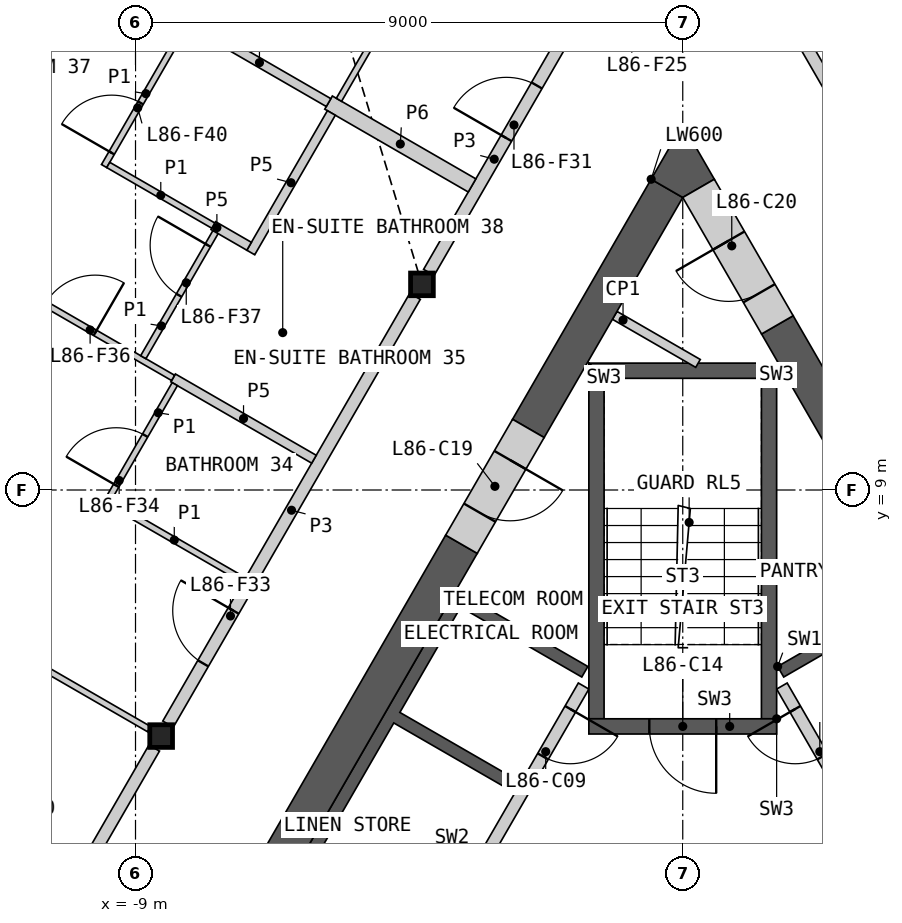
"""IFC4 building model, lengths in metres.
Left out: names, types, materials, properties, quantities, classifications, styles, units other than length and angle.
Written with IfcOpenShell. Run it as: python <this file> out.ifc"""

import sys

from ifc_helpers import new_model, si_unit, direction, frame, frame_2d, origin, origin_2d, place, context, subcontext, project, spatial, polyline, rectangle, i_section, outline, extrude, element, fill, save


model = new_model("IFC4")
c1 = context("Model", 3, precision=1e-05, world=origin(), true_north=direction((0.0, 1.0)))
c2 = subcontext(c1, "Body", "Model", "MODEL_VIEW")
j1 = project(units=[si_unit("LENGTHUNIT", "METRE"), si_unit("PLANEANGLEUNIT", "RADIAN")], contexts=[c1])
p1 = place(None, origin())
s1 = spatial("IfcSite", under=j1, at=p1, CompositionType="ELEMENT")
p2 = place(p1, origin())
s2 = spatial("IfcBuilding", under=s1, at=p2, CompositionType="ELEMENT")
p3 = place(p2, frame((0.0, 0.0, 381.4)))
s3 = spatial("IfcBuildingStorey", under=s2, at=p3, CompositionType="ELEMENT", Elevation=381.4)
for number, where, z_axis, x_axis in (
    (1, (-4.289, 12.382, 0.0), (0.0, 0.0, 1.0), (1.0, 0.0, 0.0)),
    (2, (-8.578, 4.953, 0.0), (0.0, 0.0, 1.0), (1.0, 0.0, 0.0)),
):
    element("IfcColumn", number, at=place(p3, frame(where, z_axis=z_axis, x_axis=x_axis)), inside=s3, PredefinedType="COLUMN", context=c2, shape_type="SweptSolid", body=[
        extrude(i_section(OverallWidth=0.374, OverallDepth=0.372, WebThickness=0.016, FlangeThickness=0.026, at=origin_2d()), origin(), (0.0, 0.0, 1.0), 3.4),
    ])
p4 = place(p3, origin())
e3 = element("IfcWall", 3, at=p4, inside=s3, PredefinedType="SHEAR", context=c2, shape_type="SweptSolid", body=[
    extrude(outline(polyline([(1.561, 6.097), (3.731, 7.35), (8.231, -0.444), (6.061, -1.697), (5.96, -1.524), (7.952, -0.374), (6.952, 1.358), (4.96, 0.208), (4.861, 0.381), (6.852, 1.531), (5.852, 3.263), (3.861, 2.113), (3.76, 2.287), (5.752, 3.437), (4.752, 5.169), (2.76, 4.019), (2.66, 4.192), (4.652, 5.342), (3.652, 7.074), (1.66, 5.924), (1.561, 6.097)])), origin(), (0.0, 0.0, 1.0), 3.1),
])
p5 = place(p3, frame((5.817, -1.476, 0.0), z_axis=(0.0, 0.0, 1.0), x_axis=(-0.500002616675, 0.866023893041, 0.0)))
e4 = element("IfcWall", 4, at=p5, inside=s3, PredefinedType="SOLIDWALL", context=c2, shape_type="SweptSolid", body=[
    extrude(rectangle(XDim=8.373, YDim=0.2, at=frame_2d((4.187, 0.0))), origin(), (0.0, 0.0, 1.0), 3.1),
])
p6 = place(p5, frame((0.337, 0.0, 0.0)))
e5 = element("IfcOpeningElement", 5, at=p6, cuts=e4, PredefinedType="OPENING", context=c2, shape_type="SweptSolid", body=[
    extrude(rectangle(XDim=1.1, YDim=2.1, at=frame_2d((0.55, 1.05))), frame((0.0, 0.11, 0.0), z_axis=(0.0, -1.0, 0.0), x_axis=(1.0, 0.0, 0.0)), (0.0, 0.0, 1.0), 0.22),
])
p7 = place(p5, frame((2.537, 0.0, 0.0)))
e6 = element("IfcOpeningElement", 6, at=p7, cuts=e4, PredefinedType="OPENING", context=c2, shape_type="SweptSolid", body=[
    extrude(rectangle(XDim=1.1, YDim=2.1, at=frame_2d((0.55, 1.05))), frame((0.0, 0.11, 0.0), z_axis=(0.0, -1.0, 0.0), x_axis=(1.0, 0.0, 0.0)), (0.0, 0.0, 1.0), 0.22),
])
p8 = place(p5, frame((4.737, 0.0, 0.0)))
e7 = element("IfcOpeningElement", 7, at=p8, cuts=e4, PredefinedType="OPENING", context=c2, shape_type="SweptSolid", body=[
    extrude(rectangle(XDim=1.1, YDim=2.1, at=frame_2d((0.55, 1.05))), frame((0.0, 0.11, 0.0), z_axis=(0.0, -1.0, 0.0), x_axis=(1.0, 0.0, 0.0)), (0.0, 0.0, 1.0), 0.22),
])
p9 = place(p5, frame((7.037, 0.0, 0.0)))
e8 = element("IfcOpeningElement", 8, at=p9, cuts=e4, PredefinedType="OPENING", context=c2, shape_type="SweptSolid", body=[
    extrude(rectangle(XDim=0.9, YDim=2.1, at=frame_2d((0.45, 1.05))), frame((0.0, 0.11, 0.0), z_axis=(0.0, -1.0, 0.0), x_axis=(1.0, 0.0, 0.0)), (0.0, 0.0, 1.0), 0.22),
])
p10 = place(p3, origin())
e9 = element("IfcWall", 9, at=p10, inside=s3, PredefinedType="SHEAR", context=c2, shape_type="SweptSolid", body=[
    extrude(outline(polyline([(-4.96, 0.208), (-7.131, 1.461), (-3.731, 7.35), (-1.561, 6.097), (-1.66, 5.924), (-3.652, 7.074), (-4.652, 5.342), (-2.66, 4.192), (-2.76, 4.019), (-4.752, 5.169), (-6.852, 1.531), (-4.861, 0.381), (-4.96, 0.208)])), origin(), (0.0, 0.0, 1.0), 3.1),
])
p11 = place(p3, frame((-1.631, 5.776, 0.0), z_axis=(0.0, 0.0, 1.0), x_axis=(-0.499992876559, -0.866029516466, 0.0)))
e10 = element("IfcWall", 10, at=p11, inside=s3, PredefinedType="SOLIDWALL", context=c2, shape_type="SweptSolid", body=[
    extrude(rectangle(XDim=6.486, YDim=0.2, at=frame_2d((3.243, 0.0))), origin(), (0.0, 0.0, 1.0), 3.1),
])
p12 = place(p11, frame((0.437, 0.0, 0.0)))
e11 = element("IfcOpeningElement", 11, at=p12, cuts=e10, PredefinedType="OPENING", context=c2, shape_type="SweptSolid", body=[
    extrude(rectangle(XDim=0.9, YDim=2.1, at=frame_2d((0.45, 1.05))), frame((0.0, 0.11, 0.0), z_axis=(0.0, -1.0, 0.0), x_axis=(1.0, 0.0, 0.0)), (0.0, 0.0, 1.0), 0.22),
])
p13 = place(p11, frame((3.737, 0.0, 0.0)))
e12 = element("IfcOpeningElement", 12, at=p13, cuts=e10, PredefinedType="OPENING", context=c2, shape_type="SweptSolid", body=[
    extrude(rectangle(XDim=0.9, YDim=2.1, at=frame_2d((0.45, 1.05))), frame((0.0, 0.11, 0.0), z_axis=(0.0, -1.0, 0.0), x_axis=(1.0, 0.0, 0.0)), (0.0, 0.0, 1.0), 0.22),
])
p14 = place(p3, origin())
e13 = element("IfcWall", 13, at=p14, inside=s3, PredefinedType="SHEAR", context=c2, shape_type="SweptSolid", body=[
    extrude(outline(polyline([(1.544, 5.237), (1.544, 11.087), (1.294, 10.837), (1.294, 5.237), (1.544, 5.237)])), origin(), (0.0, 0.0, 1.0), 3.1),
])
p15 = place(p3, origin())
e14 = element("IfcWall", 14, at=p15, inside=s3, PredefinedType="SHEAR", context=c2, shape_type="SweptSolid", body=[
    extrude(outline(polyline([(1.544, 11.087), (-1.544, 11.087), (-1.294, 10.837), (1.294, 10.837), (1.544, 11.087)])), origin(), (0.0, 0.0, 1.0), 3.1),
])
p16 = place(p3, origin())
e15 = element("IfcWall", 15, at=p16, inside=s3, PredefinedType="SHEAR", context=c2, shape_type="SweptSolid", body=[
    extrude(outline(polyline([(-1.294, 10.837), (-1.544, 11.087), (-1.544, 5.237), (-1.294, 5.237), (-1.294, 10.837)])), origin(), (0.0, 0.0, 1.0), 3.1),
])
p17 = place(p3, frame((1.544, 5.112, 0.0), z_axis=(0.0, 0.0, 1.0), x_axis=(-1.0, 0.0, 0.0)))
e16 = element("IfcWall", 16, at=p17, inside=s3, PredefinedType="SHEAR", context=c2, shape_type="SweptSolid", body=[
    extrude(rectangle(XDim=3.088, YDim=0.25, at=frame_2d((1.544, 0.0))), origin(), (0.0, 0.0, 1.0), 3.1),
])
p18 = place(p17, frame((0.994, 0.0, 0.0)))
e17 = element("IfcOpeningElement", 17, at=p18, cuts=e16, PredefinedType="OPENING", context=c2, shape_type="SweptSolid", body=[
    extrude(rectangle(XDim=1.1, YDim=2.1, at=frame_2d((0.55, 1.05))), frame((0.0, 0.135, 0.0), z_axis=(0.0, -1.0, 0.0), x_axis=(1.0, 0.0, 0.0)), (0.0, 0.0, 1.0), 0.27),
])
p19 = place(p3, frame((-1.119, 11.873, 0.0), z_axis=(0.0, 0.0, 1.0), x_axis=(0.865992812752, -0.500056445075, 0.0)))
e18 = element("IfcWall", 18, at=p19, inside=s3, PredefinedType="PARTITIONING", context=c2, shape_type="SweptSolid", body=[
    extrude(rectangle(XDim=1.582, YDim=0.15, at=frame_2d((0.791, 0.0))), origin(), (0.0, 0.0, 1.0), 3.1),
])
p20 = place(p3, frame((8.841, -0.902, 0.0), z_axis=(0.0, 0.0, 1.0), x_axis=(-0.499995618375, 0.866027933502, 0.0)))
e19 = element("IfcWall", 19, at=p20, inside=s3, PredefinedType="SHEAR", context=c2, shape_type="SweptSolid", body=[
    extrude(rectangle(XDim=14.571, YDim=0.6, at=frame_2d((7.285, 0.0))), origin(), (0.0, 0.0, 1.0), 3.1),
])
p21 = place(p3, frame((-3.639, 8.107, 0.0), z_axis=(0.0, 0.0, 1.0), x_axis=(-0.49999180351, -0.866030135978, 0.0)))
e20 = element("IfcWall", 20, at=p21, inside=s3, PredefinedType="SHEAR", context=c2, shape_type="SweptSolid", body=[
    extrude(rectangle(XDim=7.401, YDim=0.6, at=frame_2d((3.701, 0.0))), origin(), (0.0, 0.0, 1.0), 3.1),
])
p22 = place(p3, frame((-0.26, 13.961, 0.0), z_axis=(0.0, 0.0, 1.0), x_axis=(-0.499980485389, -0.866036670257, 0.0)))
e21 = element("IfcWall", 21, at=p22, inside=s3, PredefinedType="SHEAR", context=c2, shape_type="SweptSolid", body=[
    extrude(rectangle(XDim=4.559, YDim=0.6, at=frame_2d((2.28, 0.0))), origin(), (0.0, 0.0, 1.0), 3.1),
])
p23 = place(p3, origin())
e22 = element("IfcWall", 22, at=p23, inside=s3, PredefinedType="SHEAR", context=c2, shape_type="SweptSolid", body=[
    extrude(outline(polyline([(-0.52, 14.111), (0.0, 15.011), (0.52, 14.111), (0.0, 13.811), (-0.52, 14.111)])), origin(), (0.0, 0.0, 1.0), 3.1),
])
p24 = place(p3, frame((-2.539, 10.013, 0.0), z_axis=(0.0, 0.0, 1.0), x_axis=(-0.50002983664, -0.866008176907, 0.0)))
e23 = element("IfcWall", 23, at=p24, inside=s3, PredefinedType="SHEAR", context=c2, shape_type="SweptSolid", body=[
    extrude(rectangle(XDim=2.2, YDim=0.6, at=frame_2d((1.1, 0.0))), origin(), (0.0, 0.0, 1.0), 3.1),
])
p25 = place(p24, frame((0.6, 0.0, 0.0)))
e24 = element("IfcOpeningElement", 24, at=p25, cuts=e23, PredefinedType="OPENING", context=c2, shape_type="SweptSolid", body=[
    extrude(rectangle(XDim=1.0, YDim=2.1, at=frame_2d((0.5, 1.05))), frame((0.0, 0.31, 0.0), z_axis=(0.0, -1.0, 0.0), x_axis=(1.0, 0.0, 0.0)), (0.0, 0.0, 1.0), 0.62),
])
p26 = place(p3, frame((1.556, 11.716, 0.0), z_axis=(0.0, 0.0, 1.0), x_axis=(-0.500018667571, 0.866014625789, 0.0)))
e25 = element("IfcWall", 25, at=p26, inside=s3, PredefinedType="SHEAR", context=c2, shape_type="SweptSolid", body=[
    extrude(rectangle(XDim=2.592, YDim=0.6, at=frame_2d((1.296, 0.0))), origin(), (0.0, 0.0, 1.0), 3.1),
])
p27 = place(p26, frame((0.6, 0.0, 0.0)))
e26 = element("IfcOpeningElement", 26, at=p27, cuts=e25, PredefinedType="OPENING", context=c2, shape_type="SweptSolid", body=[
    extrude(rectangle(XDim=1.0, YDim=2.1, at=frame_2d((0.5, 1.05))), frame((0.0, 0.31, 0.0), z_axis=(0.0, -1.0, 0.0), x_axis=(1.0, 0.0, 0.0)), (0.0, 0.0, 1.0), 0.62),
])
p28 = place(p3, frame((-8.465, 5.15, 0.0), z_axis=(0.0, 0.0, 1.0), x_axis=(0.499992155518, 0.866029932751, 0.0)))
e27 = element("IfcWall", 27, at=p28, inside=s3, PredefinedType="PARTITIONING", context=c2, shape_type="SweptSolid", body=[
    extrude(rectangle(XDim=8.123, YDim=0.2, at=frame_2d((4.062, 0.0))), origin(), (0.0, 0.0, 1.0), 3.1),
])
p29 = place(p28, frame((1.153, 0.0, 0.0)))
e28 = element("IfcOpeningElement", 28, at=p29, cuts=e27, PredefinedType="OPENING", context=c2, shape_type="SweptSolid", body=[
    extrude(rectangle(XDim=1.0, YDim=2.1, at=frame_2d((0.5, 1.05))), frame((0.0, 0.11, 0.0), z_axis=(0.0, -1.0, 0.0), x_axis=(1.0, 0.0, 0.0)), (0.0, 0.0, 1.0), 0.22),
])
p30 = place(p3, frame((-12.754, -2.279, 0.0), z_axis=(0.0, 0.0, 1.0), x_axis=(0.500001682468, 0.866024432409, 0.0)))
e29 = element("IfcWall", 29, at=p30, inside=s3, PredefinedType="PARTITIONING", context=c2, shape_type="SweptSolid", body=[
    extrude(rectangle(XDim=8.124, YDim=0.2, at=frame_2d((4.062, 0.0))), origin(), (0.0, 0.0, 1.0), 3.1),
])
p31 = place(p30, frame((1.153, 0.0, 0.0)))
e30 = element("IfcOpeningElement", 30, at=p31, cuts=e29, PredefinedType="OPENING", context=c2, shape_type="SweptSolid", body=[
    extrude(rectangle(XDim=1.0, YDim=2.1, at=frame_2d((0.5, 1.05))), frame((0.0, 0.11, 0.0), z_axis=(0.0, -1.0, 0.0), x_axis=(1.0, 0.0, 0.0)), (0.0, 0.0, 1.0), 0.22),
])
p32 = place(p3, frame((1.913, 16.498, 0.0), z_axis=(0.0, 0.0, 1.0), x_axis=(0.499974648164, -0.866040040179, 0.0)))
e31 = element("IfcWall", 31, at=p32, inside=s3, PredefinedType="PARTITIONING", context=c2, shape_type="SweptSolid", body=[
    extrude(rectangle(XDim=4.525, YDim=0.2, at=frame_2d((2.263, 0.0))), origin(), (0.0, 0.0, 1.0), 3.1),
])
p33 = place(p3, frame((-4.176, 12.579, 0.0), z_axis=(0.0, 0.0, 1.0), x_axis=(0.500004215162, 0.866022970146, 0.0)))
e32 = element("IfcWall", 32, at=p33, inside=s3, PredefinedType="PARTITIONING", context=c2, shape_type="SweptSolid", body=[
    extrude(rectangle(XDim=4.3, YDim=0.2, at=frame_2d((2.15, 0.0))), origin(), (0.0, 0.0, 1.0), 3.1),
])
p34 = place(p33, frame((2.55, 0.0, 0.0)))
e33 = element("IfcOpeningElement", 33, at=p34, cuts=e32, PredefinedType="OPENING", context=c2, shape_type="SweptSolid", body=[
    extrude(rectangle(XDim=1.0, YDim=2.1, at=frame_2d((0.5, 1.05))), frame((0.0, 0.11, 0.0), z_axis=(0.0, -1.0, 0.0), x_axis=(1.0, 0.0, 0.0)), (0.0, 0.0, 1.0), 0.22),
])
p35 = place(p3, frame((-5.825, 15.372, 0.0), z_axis=(0.0, 0.0, 1.0), x_axis=(0.866051307416, -0.49995513091, 0.0)))
e34 = element("IfcWall", 34, at=p35, inside=s3, PredefinedType="PARTITIONING", context=c2, shape_type="SweptSolid", body=[
    extrude(rectangle(XDim=2.725, YDim=0.25, at=frame_2d((1.362, 0.0))), origin(), (0.0, 0.0, 1.0), 2.33),
])
p36 = place(p3, frame((-8.098, 16.684, 0.0), z_axis=(0.0, 0.0, 1.0), x_axis=(0.866036909293, -0.499980071345, 0.0)))
e35 = element("IfcWall", 35, at=p36, inside=s3, PredefinedType="PLUMBINGWALL", context=c2, shape_type="SweptSolid", body=[
    extrude(rectangle(XDim=2.625, YDim=0.15, at=frame_2d((1.312, 0.0))), origin(), (0.0, 0.0, 1.0), 2.33),
])
p37 = place(p3, frame((-8.382, 10.844, 0.0), z_axis=(0.0, 0.0, 1.0), x_axis=(0.866021425885, -0.500006889861, 0.0)))
e36 = element("IfcWall", 36, at=p37, inside=s3, PredefinedType="PLUMBINGWALL", context=c2, shape_type="SweptSolid", body=[
    extrude(rectangle(XDim=2.675, YDim=0.15, at=frame_2d((1.337, 0.0))), origin(), (0.0, 0.0, 1.0), 2.33),
])
p38 = place(p3, frame((-7.104, 12.906, 0.0), z_axis=(0.0, 0.0, 1.0), x_axis=(0.499993606316, 0.866029095148, 0.0)))
e37 = element("IfcWall", 37, at=p38, inside=s3, PredefinedType="PLUMBINGWALL", context=c2, shape_type="SweptSolid", body=[
    extrude(rectangle(XDim=2.65, YDim=0.15, at=frame_2d((1.325, 0.0))), origin(), (0.0, 0.0, 1.0), 2.33),
])
p39 = place(p3, frame((-7.72, 13.349, 0.0), z_axis=(0.0, 0.0, 1.0), x_axis=(0.866113839764, -0.499846793097, 0.0)))
e38 = element("IfcWall", 38, at=p39, inside=s3, PredefinedType="PLUMBINGWALL", context=c2, shape_type="SweptSolid", body=[
    extrude(rectangle(XDim=0.68, YDim=0.15, at=frame_2d((0.34, 0.0))), origin(), (0.0, 0.0, 1.0), 2.33),
])
p40 = place(p3, frame((-18.869, 10.894, 0.0), z_axis=(0.0, 0.0, 1.0), x_axis=(0.866023724155, -0.500002909193, 0.0)))
e39 = element("IfcWall", 39, at=p40, inside=s3, PredefinedType="PARTITIONING", context=c2, shape_type="SweptSolid", body=[
    extrude(rectangle(XDim=11.655, YDim=0.1, at=frame_2d((5.827, 0.0))), origin(), (0.0, 0.0, 1.0), 2.33),
])
p41 = place(p40, frame((6.253, 0.0, 0.0)))
e40 = element("IfcOpeningElement", 40, at=p41, cuts=e39, PredefinedType="OPENING", context=c2, shape_type="SweptSolid", body=[
    extrude(rectangle(XDim=0.95, YDim=2.1, at=frame_2d((0.475, 1.05))), frame((0.0, 0.06, 0.0), z_axis=(0.0, -1.0, 0.0), x_axis=(1.0, 0.0, 0.0)), (0.0, 0.0, 1.0), 0.12),
])
p42 = place(p3, frame((-9.517, 14.328, 0.0), z_axis=(0.0, 0.0, 1.0), x_axis=(0.499996545922, 0.866027397988, 0.0)))
e41 = element("IfcWall", 41, at=p42, inside=s3, PredefinedType="PARTITIONING", context=c2, shape_type="SweptSolid", body=[
    extrude(rectangle(XDim=5.5, YDim=0.1, at=frame_2d((2.75, 0.0))), origin(), (0.0, 0.0, 1.0), 2.33),
])
p43 = place(p42, frame((4.3, 0.0, 0.0)))
e42 = element("IfcOpeningElement", 42, at=p43, cuts=e41, PredefinedType="OPENING", context=c2, shape_type="SweptSolid", body=[
    extrude(rectangle(XDim=0.95, YDim=2.1, at=frame_2d((0.475, 1.05))), frame((0.0, 0.06, 0.0), z_axis=(0.0, -1.0, 0.0), x_axis=(1.0, 0.0, 0.0)), (0.0, 0.0, 1.0), 0.12),
])
p44 = place(p42, frame((0.25, 0.0, 0.0)))
e43 = element("IfcOpeningElement", 43, at=p44, cuts=e41, PredefinedType="OPENING", context=c2, shape_type="SweptSolid", body=[
    extrude(rectangle(XDim=0.95, YDim=2.1, at=frame_2d((0.475, 1.05))), frame((0.0, 0.06, 0.0), z_axis=(0.0, -1.0, 0.0), x_axis=(1.0, 0.0, 0.0)), (0.0, 0.0, 1.0), 0.12),
])
p45 = place(p3, frame((-12.214, 13.056, 0.0), z_axis=(0.0, 0.0, 1.0), x_axis=(0.866017452598, -0.500013771606, 0.0)))
e44 = element("IfcWall", 44, at=p45, inside=s3, PredefinedType="PARTITIONING", context=c2, shape_type="SweptSolid", body=[
    extrude(rectangle(XDim=4.425, YDim=0.1, at=frame_2d((2.213, 0.0))), origin(), (0.0, 0.0, 1.0), 2.33),
])
p46 = place(p45, frame((1.994, 0.0, 0.0)))
e45 = element("IfcOpeningElement", 45, at=p46, cuts=e44, PredefinedType="OPENING", context=c2, shape_type="SweptSolid", body=[
    extrude(rectangle(XDim=0.95, YDim=2.1, at=frame_2d((0.475, 1.05))), frame((0.0, 0.06, 0.0), z_axis=(0.0, -1.0, 0.0), x_axis=(1.0, 0.0, 0.0)), (0.0, 0.0, 1.0), 0.12),
])
p47 = place(p3, frame((-5.654, 15.418, 0.0), z_axis=(0.0, 0.0, 1.0), x_axis=(0.500048846702, 0.865997200291, 0.0)))
e46 = element("IfcWall", 46, at=p47, inside=s3, PredefinedType="PARTITIONING", context=c2, shape_type="SweptSolid", body=[
    extrude(rectangle(XDim=2.525, YDim=0.1, at=frame_2d((1.263, 0.0))), origin(), (0.0, 0.0, 1.0), 2.33),
])
p48 = place(p3, frame((-9.51, 8.839, 0.0), z_axis=(0.0, 0.0, 1.0), x_axis=(0.866029095148, -0.499993606316, 0.0)))
e47 = element("IfcWall", 47, at=p48, inside=s3, PredefinedType="PARTITIONING", context=c2, shape_type="SweptSolid", body=[
    extrude(rectangle(XDim=2.65, YDim=0.1, at=frame_2d((1.325, 0.0))), origin(), (0.0, 0.0, 1.0), 2.33),
])
p49 = place(p3, frame((-8.872, 11.184, 0.0), z_axis=(0.0, 0.0, 1.0), x_axis=(0.499986429846, 0.866033238375, 0.0)))
e48 = element("IfcWall", 48, at=p49, inside=s3, PredefinedType="PARTITIONING", context=c2, shape_type="SweptSolid", body=[
    extrude(rectangle(XDim=2.375, YDim=0.1, at=frame_2d((1.188, 0.0))), origin(), (0.0, 0.0, 1.0), 2.33),
])
p50 = place(p49, frame((1.175, 0.0, 0.0)))
e49 = element("IfcOpeningElement", 49, at=p50, cuts=e48, PredefinedType="OPENING", context=c2, shape_type="SweptSolid", body=[
    extrude(rectangle(XDim=0.95, YDim=2.1, at=frame_2d((0.475, 1.05))), frame((0.0, 0.06, 0.0), z_axis=(0.0, -1.0, 0.0), x_axis=(1.0, 0.0, 0.0)), (0.0, 0.0, 1.0), 0.12),
])
p51 = place(p3, frame((-9.442, 8.858, 0.0), z_axis=(0.0, 0.0, 1.0), x_axis=(0.499978335414, 0.866037911478, 0.0)))
e50 = element("IfcWall", 50, at=p51, inside=s3, PredefinedType="PARTITIONING", context=c2, shape_type="SweptSolid", body=[
    extrude(rectangle(XDim=2.175, YDim=0.1, at=frame_2d((1.087, 0.0))), origin(), (0.0, 0.0, 1.0), 2.33),
])
p52 = place(p51, frame((0.25, 0.0, 0.0)))
e51 = element("IfcOpeningElement", 51, at=p52, cuts=e50, PredefinedType="OPENING", context=c2, shape_type="SweptSolid", body=[
    extrude(rectangle(XDim=0.95, YDim=2.1, at=frame_2d((0.475, 1.05))), frame((0.0, 0.06, 0.0), z_axis=(0.0, -1.0, 0.0), x_axis=(1.0, 0.0, 0.0)), (0.0, 0.0, 1.0), 0.12),
])
p53 = place(p3, frame((-9.448, 14.346, 0.0), z_axis=(0.0, 0.0, 1.0), x_axis=(0.866020521143, -0.500008456887, 0.0)))
e52 = element("IfcWall", 52, at=p53, inside=s3, PredefinedType="PARTITIONING", context=c2, shape_type="SweptSolid", body=[
    extrude(rectangle(XDim=1.995, YDim=0.1, at=frame_2d((0.998, 0.0))), origin(), (0.0, 0.0, 1.0), 2.33),
])
p54 = place(p9, origin())
e53 = element("IfcDoor", 53, at=p54, inside=s3, OperationType="SINGLE_SWING_RIGHT", PredefinedType="DOOR", context=c2, shape_type="SweptSolid", body=[
    extrude(rectangle(XDim=0.9, YDim=2.1, at=frame_2d((0.45, 1.05))), frame((0.0, 0.025, 0.0), z_axis=(0.0, -1.0, 0.0), x_axis=(1.0, 0.0, 0.0)), (0.0, 0.0, 1.0), 0.05),
])
fill(e8, e53)
p55 = place(p12, origin())
e54 = element("IfcDoor", 54, at=p55, inside=s3, OperationType="SINGLE_SWING_LEFT", PredefinedType="DOOR", context=c2, shape_type="SweptSolid", body=[
    extrude(rectangle(XDim=0.9, YDim=2.1, at=frame_2d((0.45, 1.05))), frame((0.0, 0.025, 0.0), z_axis=(0.0, -1.0, 0.0), x_axis=(1.0, 0.0, 0.0)), (0.0, 0.0, 1.0), 0.05),
])
fill(e11, e54)
p56 = place(p18, origin())
e55 = element("IfcDoor", 55, at=p56, inside=s3, OperationType="SINGLE_SWING_LEFT", PredefinedType="DOOR", context=c2, shape_type="SweptSolid", body=[
    extrude(rectangle(XDim=1.1, YDim=2.1, at=frame_2d((0.55, 1.05))), frame((0.0, 0.025, 0.0), z_axis=(0.0, -1.0, 0.0), x_axis=(1.0, 0.0, 0.0)), (0.0, 0.0, 1.0), 0.05),
])
fill(e17, e55)
p57 = place(p25, origin())
e56 = element("IfcDoor", 56, at=p57, inside=s3, OperationType="SINGLE_SWING_LEFT", PredefinedType="DOOR", context=c2, shape_type="SweptSolid", body=[
    extrude(rectangle(XDim=1.0, YDim=2.1, at=frame_2d((0.5, 1.05))), frame((0.0, 0.055, 0.0), z_axis=(0.0, -1.0, 0.0), x_axis=(1.0, 0.0, 0.0)), (0.0, 0.0, 1.0), 0.05),
])
fill(e24, e56)
p58 = place(p27, origin())
e57 = element("IfcDoor", 57, at=p58, inside=s3, OperationType="SINGLE_SWING_RIGHT", PredefinedType="DOOR", context=c2, shape_type="SweptSolid", body=[
    extrude(rectangle(XDim=1.0, YDim=2.1, at=frame_2d((0.5, 1.05))), frame((0.0, 0.055, 0.0), z_axis=(0.0, -1.0, 0.0), x_axis=(1.0, 0.0, 0.0)), (0.0, 0.0, 1.0), 0.05),
])
fill(e26, e57)
p59 = place(p34, origin())
e58 = element("IfcDoor", 58, at=p59, inside=s3, OperationType="SINGLE_SWING_LEFT", PredefinedType="DOOR", context=c2, shape_type="SweptSolid", body=[
    extrude(rectangle(XDim=1.0, YDim=2.1, at=frame_2d((0.5, 1.05))), frame((0.0, 0.025, 0.0), z_axis=(0.0, -1.0, 0.0), x_axis=(1.0, 0.0, 0.0)), (0.0, 0.0, 1.0), 0.05),
])
fill(e33, e58)
p60 = place(p29, origin())
e59 = element("IfcDoor", 59, at=p60, inside=s3, OperationType="SINGLE_SWING_RIGHT", PredefinedType="DOOR", context=c2, shape_type="SweptSolid", body=[
    extrude(rectangle(XDim=1.0, YDim=2.1, at=frame_2d((0.5, 1.05))), frame((0.0, 0.025, 0.0), z_axis=(0.0, -1.0, 0.0), x_axis=(1.0, 0.0, 0.0)), (0.0, 0.0, 1.0), 0.05),
])
fill(e28, e59)
p61 = place(p52, origin())
e60 = element("IfcDoor", 60, at=p61, inside=s3, OperationType="SINGLE_SWING_LEFT", PredefinedType="DOOR", context=c2, shape_type="SweptSolid", body=[
    extrude(rectangle(XDim=0.95, YDim=2.1, at=frame_2d((0.475, 1.05))), frame((0.0, 0.025, 0.0), z_axis=(0.0, -1.0, 0.0), x_axis=(1.0, 0.0, 0.0)), (0.0, 0.0, 1.0), 0.05),
])
fill(e51, e60)
p62 = place(p46, origin())
e61 = element("IfcDoor", 61, at=p62, inside=s3, OperationType="SINGLE_SWING_RIGHT", PredefinedType="DOOR", context=c2, shape_type="SweptSolid", body=[
    extrude(rectangle(XDim=0.95, YDim=2.1, at=frame_2d((0.475, 1.05))), frame((0.0, 0.025, 0.0), z_axis=(0.0, -1.0, 0.0), x_axis=(1.0, 0.0, 0.0)), (0.0, 0.0, 1.0), 0.05),
])
fill(e45, e61)
p63 = place(p50, origin())
e62 = element("IfcDoor", 62, at=p63, inside=s3, OperationType="SINGLE_SWING_RIGHT", PredefinedType="DOOR", context=c2, shape_type="SweptSolid", body=[
    extrude(rectangle(XDim=0.95, YDim=2.1, at=frame_2d((0.475, 1.05))), frame((0.0, 0.025, 0.0), z_axis=(0.0, -1.0, 0.0), x_axis=(1.0, 0.0, 0.0)), (0.0, 0.0, 1.0), 0.05),
])
fill(e49, e62)
p64 = place(p44, origin())
e63 = element("IfcDoor", 63, at=p64, inside=s3, OperationType="SINGLE_SWING_LEFT", PredefinedType="DOOR", context=c2, shape_type="SweptSolid", body=[
    extrude(rectangle(XDim=0.95, YDim=2.1, at=frame_2d((0.475, 1.05))), frame((0.0, 0.025, 0.0), z_axis=(0.0, -1.0, 0.0), x_axis=(1.0, 0.0, 0.0)), (0.0, 0.0, 1.0), 0.05),
])
fill(e43, e63)
save(model, sys.argv[1])
